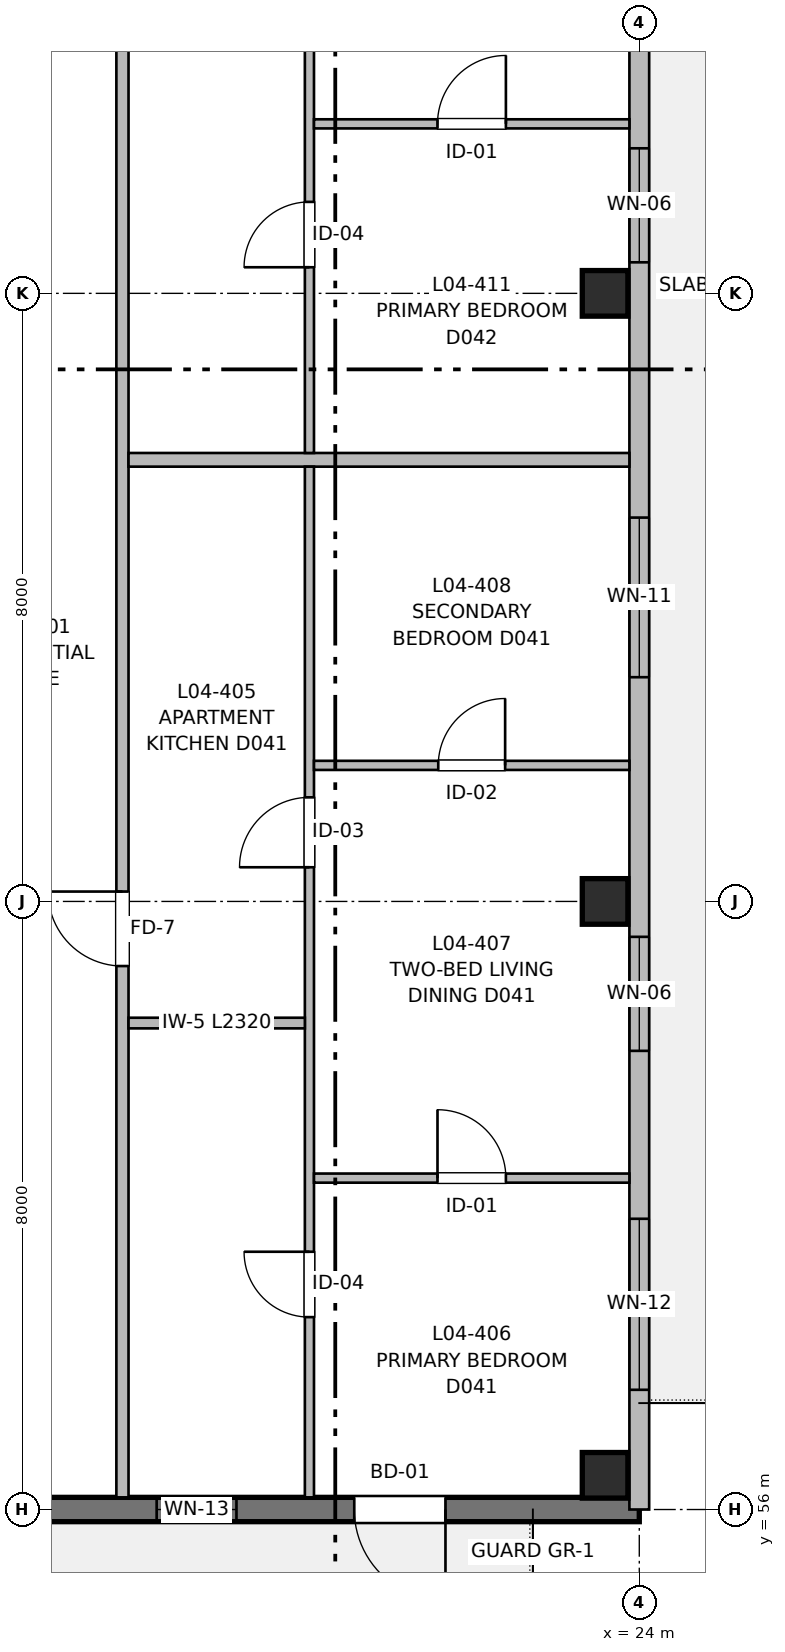
"""IFC4 building model, lengths in metres.
Left out: names, types, materials, properties, quantities, classifications, styles, units other than length and angle.
Written with IfcOpenShell. Run it as: python <this file> out.ifc"""

import sys

from ifc_helpers import new_model, si_unit, direction, frame, frame_2d, origin, origin_2d, place, context, subcontext, project, spatial, rectangle, extrude, element, fill, save


model = new_model("IFC4")
c1 = context("Model", 3, precision=1e-05, world=origin(), true_north=direction((0.0, 1.0)))
c2 = subcontext(c1, "Body", "Model", "MODEL_VIEW")
j1 = project(units=[si_unit("LENGTHUNIT", "METRE"), si_unit("PLANEANGLEUNIT", "RADIAN")], contexts=[c1])
p1 = place(None, origin())
s1 = spatial("IfcSite", under=j1, at=p1, CompositionType="ELEMENT")
p2 = place(p1, origin())
s2 = spatial("IfcBuilding", under=s1, at=p2, CompositionType="ELEMENT")
p3 = place(p2, frame((0.0, 0.0, 13.76)))
s3 = spatial("IfcBuildingStorey", under=s2, at=p3, CompositionType="ELEMENT", Elevation=13.76)
for number, where, z_axis, x_axis in (
    (1, (23.55, 56.45, 0.0), (0.0, 0.0, 1.0), (1.0, 0.0, 0.0)),
    (2, (23.55, 64.0, 0.0), (0.0, 0.0, 1.0), (1.0, 0.0, 0.0)),
    (3, (23.55, 72.0, 0.0), (0.0, 0.0, 1.0), (1.0, 0.0, 0.0)),
):
    element("IfcColumn", number, at=place(p3, frame(where, z_axis=z_axis, x_axis=x_axis)), inside=s3, PredefinedType="COLUMN", context=c2, shape_type="SweptSolid", body=[
        extrude(rectangle(XDim=0.6, YDim=0.6, at=origin_2d()), origin(), (0.0, 0.0, 1.0), 3.2),
    ])
p4 = place(p3, frame((24.0, 56.0, 0.0), z_axis=(0.0, 0.0, 1.0), x_axis=(-1.0, 0.0, 0.0)))
e4 = element("IfcWall", 4, at=p4, inside=s3, PredefinedType="SHEAR", context=c2, shape_type="SweptSolid", body=[
    extrude(rectangle(XDim=16.0, YDim=0.32, at=frame_2d((8.0, 0.0))), origin(), (0.0, 0.0, 1.0), 2.98),
])
p5 = place(p4, frame((2.55, 0.0, 0.0)))
e5 = element("IfcOpeningElement", 5, at=p5, cuts=e4, PredefinedType="OPENING", context=c2, shape_type="SweptSolid", body=[
    extrude(rectangle(XDim=1.2, YDim=2.2, at=frame_2d((0.6, 1.1))), frame((0.0, 0.17, 0.0), z_axis=(0.0, -1.0, 0.0), x_axis=(1.0, 0.0, 0.0)), (0.0, 0.0, 1.0), 0.34),
])
p6 = place(p4, frame((5.3, 0.0, 0.9)))
e6 = element("IfcOpeningElement", 6, at=p6, cuts=e4, PredefinedType="OPENING", context=c2, shape_type="SweptSolid", body=[
    extrude(rectangle(XDim=1.05, YDim=1.15, at=frame_2d((0.525, 0.575))), frame((0.0, 0.17, 0.0), z_axis=(0.0, -1.0, 0.0), x_axis=(1.0, 0.0, 0.0)), (0.0, 0.0, 1.0), 0.34),
])
p7 = place(p4, frame((11.35, 0.0, 0.82)))
e7 = element("IfcOpeningElement", 7, at=p7, cuts=e4, PredefinedType="OPENING", context=c2, shape_type="SweptSolid", body=[
    extrude(rectangle(XDim=1.3, YDim=1.4, at=frame_2d((0.65, 0.7))), frame((0.0, 0.17, 0.0), z_axis=(0.0, -1.0, 0.0), x_axis=(1.0, 0.0, 0.0)), (0.0, 0.0, 1.0), 0.34),
])
p8 = place(p3, frame((24.0, 88.0, 0.0), z_axis=(0.0, 0.0, 1.0), x_axis=(0.0, -1.0, 0.0)))
e8 = element("IfcWall", 8, at=p8, inside=s3, PredefinedType="SOLIDWALL", context=c2, shape_type="SweptSolid", body=[
    extrude(rectangle(XDim=32.0, YDim=0.26, at=frame_2d((16.0, 0.0))), origin(), (0.0, 0.0, 1.0), 2.98),
])
p9 = place(p8, frame((2.1, 0.0, 0.0)))
e9 = element("IfcOpeningElement", 9, at=p9, cuts=e8, PredefinedType="OPENING", context=c2, shape_type="SweptSolid", body=[
    extrude(rectangle(XDim=1.2, YDim=2.2, at=frame_2d((0.6, 1.1))), frame((0.0, 0.14, 0.0), z_axis=(0.0, -1.0, 0.0), x_axis=(1.0, 0.0, 0.0)), (0.0, 0.0, 1.0), 0.28),
])
p10 = place(p8, frame((5.3, 0.0, 0.9)))
e10 = element("IfcOpeningElement", 10, at=p10, cuts=e8, PredefinedType="OPENING", context=c2, shape_type="SweptSolid", body=[
    extrude(rectangle(XDim=1.05, YDim=1.15, at=frame_2d((0.525, 0.575))), frame((0.0, 0.14, 0.0), z_axis=(0.0, -1.0, 0.0), x_axis=(1.0, 0.0, 0.0)), (0.0, 0.0, 1.0), 0.28),
])
p11 = place(p8, frame((11.35, 0.0, 0.82)))
e11 = element("IfcOpeningElement", 11, at=p11, cuts=e8, PredefinedType="OPENING", context=c2, shape_type="SweptSolid", body=[
    extrude(rectangle(XDim=1.3, YDim=1.4, at=frame_2d((0.65, 0.7))), frame((0.0, 0.14, 0.0), z_axis=(0.0, -1.0, 0.0), x_axis=(1.0, 0.0, 0.0)), (0.0, 0.0, 1.0), 0.28),
])
p12 = place(p8, frame((18.95, 0.0, 0.67)))
e12 = element("IfcOpeningElement", 12, at=p12, cuts=e8, PredefinedType="OPENING", context=c2, shape_type="SweptSolid", body=[
    extrude(rectangle(XDim=2.1, YDim=1.55, at=frame_2d((1.05, 0.775))), frame((0.0, 0.14, 0.0), z_axis=(0.0, -1.0, 0.0), x_axis=(1.0, 0.0, 0.0)), (0.0, 0.0, 1.0), 0.28),
])
p13 = place(p8, frame((28.175, 0.0, 0.72)))
e13 = element("IfcOpeningElement", 13, at=p13, cuts=e8, PredefinedType="OPENING", context=c2, shape_type="SweptSolid", body=[
    extrude(rectangle(XDim=2.25, YDim=1.5, at=frame_2d((1.125, 0.75))), frame((0.0, 0.14, 0.0), z_axis=(0.0, -1.0, 0.0), x_axis=(1.0, 0.0, 0.0)), (0.0, 0.0, 1.0), 0.28),
])
p14 = place(p8, frame((24.466, 0.0, 0.82)))
e14 = element("IfcOpeningElement", 14, at=p14, cuts=e8, PredefinedType="OPENING", context=c2, shape_type="SweptSolid", body=[
    extrude(rectangle(XDim=1.5, YDim=1.4, at=frame_2d((0.75, 0.7))), frame((0.0, 0.14, 0.0), z_axis=(0.0, -1.0, 0.0), x_axis=(1.0, 0.0, 0.0)), (0.0, 0.0, 1.0), 0.28),
])
p15 = place(p8, frame((14.092, 0.0, 0.82)))
e15 = element("IfcOpeningElement", 15, at=p15, cuts=e8, PredefinedType="OPENING", context=c2, shape_type="SweptSolid", body=[
    extrude(rectangle(XDim=1.5, YDim=1.4, at=frame_2d((0.75, 0.7))), frame((0.0, 0.14, 0.0), z_axis=(0.0, -1.0, 0.0), x_axis=(1.0, 0.0, 0.0)), (0.0, 0.0, 1.0), 0.28),
])
p16 = place(p3, frame((17.2, 56.16, 0.0), z_axis=(0.0, 0.0, 1.0), x_axis=(0.0, 1.0, 0.0)))
e16 = element("IfcWall", 16, at=p16, inside=s3, PredefinedType="PARTITIONING", context=c2, shape_type="SweptSolid", body=[
    extrude(rectangle(XDim=50.64, YDim=0.16, at=frame_2d((25.32, 0.0))), origin(), (0.0, 0.0, 1.0), 2.935),
])
p17 = place(p16, frame((6.99, 0.0, 0.0)))
e17 = element("IfcOpeningElement", 17, at=p17, cuts=e16, PredefinedType="OPENING", context=c2, shape_type="SweptSolid", body=[
    extrude(rectangle(XDim=0.98, YDim=2.15, at=frame_2d((0.49, 1.075))), frame((0.0, 0.09, 0.0), z_axis=(0.0, -1.0, 0.0), x_axis=(1.0, 0.0, 0.0)), (0.0, 0.0, 1.0), 0.18),
])
p18 = place(p16, frame((20.92, 0.0, 0.0)))
e18 = element("IfcOpeningElement", 18, at=p18, cuts=e16, PredefinedType="OPENING", context=c2, shape_type="SweptSolid", body=[
    extrude(rectangle(XDim=0.98, YDim=2.15, at=frame_2d((0.49, 1.075))), frame((0.0, 0.09, 0.0), z_axis=(0.0, -1.0, 0.0), x_axis=(1.0, 0.0, 0.0)), (0.0, 0.0, 1.0), 0.18),
])
p19 = place(p16, frame((33.68, 0.0, 0.0)))
e19 = element("IfcOpeningElement", 19, at=p19, cuts=e16, PredefinedType="OPENING", context=c2, shape_type="SweptSolid", body=[
    extrude(rectangle(XDim=0.98, YDim=2.15, at=frame_2d((0.49, 1.075))), frame((0.0, 0.09, 0.0), z_axis=(0.0, -1.0, 0.0), x_axis=(1.0, 0.0, 0.0)), (0.0, 0.0, 1.0), 0.18),
])
p20 = place(p16, frame((45.08, 0.0, 0.0)))
e20 = element("IfcOpeningElement", 20, at=p20, cuts=e16, PredefinedType="OPENING", context=c2, shape_type="SweptSolid", body=[
    extrude(rectangle(XDim=0.98, YDim=2.15, at=frame_2d((0.49, 1.075))), frame((0.0, 0.09, 0.0), z_axis=(0.0, -1.0, 0.0), x_axis=(1.0, 0.0, 0.0)), (0.0, 0.0, 1.0), 0.18),
])
p21 = place(p3, frame((17.28, 69.81, 0.0), z_axis=(0.0, 0.0, 1.0), x_axis=(1.0, 0.0, 0.0)))
e21 = element("IfcWall", 21, at=p21, inside=s3, PredefinedType="PARTITIONING", context=c2, shape_type="SweptSolid", body=[
    extrude(rectangle(XDim=6.59, YDim=0.18, at=frame_2d((3.295, 0.0))), origin(), (0.0, 0.0, 1.0), 2.935),
])
p22 = place(p3, frame((19.66, 56.16, 0.0), z_axis=(0.0, 0.0, 1.0), x_axis=(0.0, 1.0, 0.0)))
e22 = element("IfcWall", 22, at=p22, inside=s3, PredefinedType="PARTITIONING", context=c2, shape_type="SweptSolid", body=[
    extrude(rectangle(XDim=13.56, YDim=0.12, at=frame_2d((6.78, 0.0))), origin(), (0.0, 0.0, 1.0), 2.935),
])
p23 = place(p22, frame((2.371, 0.0, 0.0)))
e23 = element("IfcOpeningElement", 23, at=p23, cuts=e22, PredefinedType="OPENING", context=c2, shape_type="SweptSolid", body=[
    extrude(rectangle(XDim=0.86, YDim=2.1, at=frame_2d((0.43, 1.05))), frame((0.0, 0.07, 0.0), z_axis=(0.0, -1.0, 0.0), x_axis=(1.0, 0.0, 0.0)), (0.0, 0.0, 1.0), 0.14),
])
p24 = place(p22, frame((8.29, 0.0, 0.0)))
e24 = element("IfcOpeningElement", 24, at=p24, cuts=e22, PredefinedType="OPENING", context=c2, shape_type="SweptSolid", body=[
    extrude(rectangle(XDim=0.92, YDim=2.1, at=frame_2d((0.46, 1.05))), frame((0.0, 0.07, 0.0), z_axis=(0.0, -1.0, 0.0), x_axis=(1.0, 0.0, 0.0)), (0.0, 0.0, 1.0), 0.14),
])
p25 = place(p3, frame((17.28, 62.4, 0.0), z_axis=(0.0, 0.0, 1.0), x_axis=(1.0, 0.0, 0.0)))
e25 = element("IfcWall", 25, at=p25, inside=s3, PredefinedType="PARTITIONING", context=c2, shape_type="SweptSolid", body=[
    extrude(rectangle(XDim=2.32, YDim=0.14, at=frame_2d((1.16, 0.0))), origin(), (0.0, 0.0, 1.0), 2.935),
])
p26 = place(p3, frame((19.72, 60.36, 0.0), z_axis=(0.0, 0.0, 1.0), x_axis=(1.0, 0.0, 0.0)))
e26 = element("IfcWall", 26, at=p26, inside=s3, PredefinedType="PARTITIONING", context=c2, shape_type="SweptSolid", body=[
    extrude(rectangle(XDim=4.15, YDim=0.12, at=frame_2d((2.075, 0.0))), origin(), (0.0, 0.0, 1.0), 2.935),
])
p27 = place(p26, frame((1.625, 0.0, 0.0)))
e27 = element("IfcOpeningElement", 27, at=p27, cuts=e26, PredefinedType="OPENING", context=c2, shape_type="SweptSolid", body=[
    extrude(rectangle(XDim=0.9, YDim=2.1, at=frame_2d((0.45, 1.05))), frame((0.0, 0.07, 0.0), z_axis=(0.0, -1.0, 0.0), x_axis=(1.0, 0.0, 0.0)), (0.0, 0.0, 1.0), 0.14),
])
p28 = place(p3, frame((19.72, 65.79, 0.0), z_axis=(0.0, 0.0, 1.0), x_axis=(1.0, 0.0, 0.0)))
e28 = element("IfcWall", 28, at=p28, inside=s3, PredefinedType="PARTITIONING", context=c2, shape_type="SweptSolid", body=[
    extrude(rectangle(XDim=4.15, YDim=0.12, at=frame_2d((2.075, 0.0))), origin(), (0.0, 0.0, 1.0), 2.935),
])
p29 = place(p28, frame((1.635, 0.0, 0.0)))
e29 = element("IfcOpeningElement", 29, at=p29, cuts=e28, PredefinedType="OPENING", context=c2, shape_type="SweptSolid", body=[
    extrude(rectangle(XDim=0.88, YDim=2.1, at=frame_2d((0.44, 1.05))), frame((0.0, 0.07, 0.0), z_axis=(0.0, -1.0, 0.0), x_axis=(1.0, 0.0, 0.0)), (0.0, 0.0, 1.0), 0.14),
])
p30 = place(p3, frame((19.66, 69.9, 0.0), z_axis=(0.0, 0.0, 1.0), x_axis=(0.0, 1.0, 0.0)))
e30 = element("IfcWall", 30, at=p30, inside=s3, PredefinedType="PARTITIONING", context=c2, shape_type="SweptSolid", body=[
    extrude(rectangle(XDim=13.98, YDim=0.12, at=frame_2d((6.99, 0.0))), origin(), (0.0, 0.0, 1.0), 2.935),
])
p31 = place(p30, frame((2.443, 0.0, 0.0)))
e31 = element("IfcOpeningElement", 31, at=p31, cuts=e30, PredefinedType="OPENING", context=c2, shape_type="SweptSolid", body=[
    extrude(rectangle(XDim=0.86, YDim=2.1, at=frame_2d((0.43, 1.05))), frame((0.0, 0.07, 0.0), z_axis=(0.0, -1.0, 0.0), x_axis=(1.0, 0.0, 0.0)), (0.0, 0.0, 1.0), 0.14),
])
p32 = place(p30, frame((8.544, 0.0, 0.0)))
e32 = element("IfcOpeningElement", 32, at=p32, cuts=e30, PredefinedType="OPENING", context=c2, shape_type="SweptSolid", body=[
    extrude(rectangle(XDim=0.92, YDim=2.1, at=frame_2d((0.46, 1.05))), frame((0.0, 0.07, 0.0), z_axis=(0.0, -1.0, 0.0), x_axis=(1.0, 0.0, 0.0)), (0.0, 0.0, 1.0), 0.14),
])
p33 = place(p3, frame((19.72, 74.23, 0.0), z_axis=(0.0, 0.0, 1.0), x_axis=(1.0, 0.0, 0.0)))
e33 = element("IfcWall", 33, at=p33, inside=s3, PredefinedType="PARTITIONING", context=c2, shape_type="SweptSolid", body=[
    extrude(rectangle(XDim=4.15, YDim=0.12, at=frame_2d((2.075, 0.0))), origin(), (0.0, 0.0, 1.0), 2.935),
])
p34 = place(p33, frame((1.625, 0.0, 0.0)))
e34 = element("IfcOpeningElement", 34, at=p34, cuts=e33, PredefinedType="OPENING", context=c2, shape_type="SweptSolid", body=[
    extrude(rectangle(XDim=0.9, YDim=2.1, at=frame_2d((0.45, 1.05))), frame((0.0, 0.07, 0.0), z_axis=(0.0, -1.0, 0.0), x_axis=(1.0, 0.0, 0.0)), (0.0, 0.0, 1.0), 0.14),
])
p35 = place(p5, origin())
e35 = element("IfcDoor", 35, at=p35, inside=s3, OperationType="SINGLE_SWING_LEFT", PredefinedType="DOOR", context=c2, shape_type="SweptSolid", body=[
    extrude(rectangle(XDim=1.2, YDim=2.2, at=frame_2d((0.6, 1.1))), frame((0.0, 0.025, 0.0), z_axis=(0.0, -1.0, 0.0), x_axis=(1.0, 0.0, 0.0)), (0.0, 0.0, 1.0), 0.05),
])
fill(e5, e35)
p36 = place(p6, origin())
e36 = element("IfcWindow", 36, at=p36, inside=s3, PartitioningType="SINGLE_PANEL", PredefinedType="WINDOW", context=c2, shape_type="SweptSolid", body=[
    extrude(rectangle(XDim=1.05, YDim=1.15, at=frame_2d((0.525, 0.575))), frame((0.0, 0.03, 0.0), z_axis=(0.0, -1.0, 0.0), x_axis=(1.0, 0.0, 0.0)), (0.0, 0.0, 1.0), 0.06),
])
fill(e6, e36)
p37 = place(p12, origin())
e37 = element("IfcWindow", 37, at=p37, inside=s3, PartitioningType="SINGLE_PANEL", PredefinedType="WINDOW", context=c2, shape_type="SweptSolid", body=[
    extrude(rectangle(XDim=2.1, YDim=1.55, at=frame_2d((1.05, 0.775))), frame((0.0, 0.03, 0.0), z_axis=(0.0, -1.0, 0.0), x_axis=(1.0, 0.0, 0.0)), (0.0, 0.0, 1.0), 0.06),
])
fill(e12, e37)
p38 = place(p13, origin())
e38 = element("IfcWindow", 38, at=p38, inside=s3, PartitioningType="SINGLE_PANEL", PredefinedType="WINDOW", context=c2, shape_type="SweptSolid", body=[
    extrude(rectangle(XDim=2.25, YDim=1.5, at=frame_2d((1.125, 0.75))), frame((0.0, 0.03, 0.0), z_axis=(0.0, -1.0, 0.0), x_axis=(1.0, 0.0, 0.0)), (0.0, 0.0, 1.0), 0.06),
])
fill(e13, e38)
p39 = place(p23, origin())
e39 = element("IfcDoor", 39, at=p39, inside=s3, OperationType="SINGLE_SWING_RIGHT", PredefinedType="DOOR", context=c2, shape_type="SweptSolid", body=[
    extrude(rectangle(XDim=0.86, YDim=2.1, at=frame_2d((0.43, 1.05))), frame((0.0, 0.025, 0.0), z_axis=(0.0, -1.0, 0.0), x_axis=(1.0, 0.0, 0.0)), (0.0, 0.0, 1.0), 0.05),
])
fill(e23, e39)
p40 = place(p24, origin())
e40 = element("IfcDoor", 40, at=p40, inside=s3, OperationType="SINGLE_SWING_LEFT", PredefinedType="DOOR", context=c2, shape_type="SweptSolid", body=[
    extrude(rectangle(XDim=0.92, YDim=2.1, at=frame_2d((0.46, 1.05))), frame((0.0, 0.025, 0.0), z_axis=(0.0, -1.0, 0.0), x_axis=(1.0, 0.0, 0.0)), (0.0, 0.0, 1.0), 0.05),
])
fill(e24, e40)
p41 = place(p17, origin())
e41 = element("IfcDoor", 41, at=p41, inside=s3, OperationType="SINGLE_SWING_RIGHT", PredefinedType="DOOR", context=c2, shape_type="SweptSolid", body=[
    extrude(rectangle(XDim=0.98, YDim=2.15, at=frame_2d((0.49, 1.075))), frame((0.0, 0.025, 0.0), z_axis=(0.0, -1.0, 0.0), x_axis=(1.0, 0.0, 0.0)), (0.0, 0.0, 1.0), 0.05),
])
fill(e17, e41)
p42 = place(p27, origin())
e42 = element("IfcDoor", 42, at=p42, inside=s3, OperationType="SINGLE_SWING_LEFT", PredefinedType="DOOR", context=c2, shape_type="SweptSolid", body=[
    extrude(rectangle(XDim=0.9, YDim=2.1, at=frame_2d((0.45, 1.05))), frame((0.0, 0.025, 0.0), z_axis=(0.0, -1.0, 0.0), x_axis=(1.0, 0.0, 0.0)), (0.0, 0.0, 1.0), 0.05),
])
fill(e27, e42)
p43 = place(p29, origin())
e43 = element("IfcDoor", 43, at=p43, inside=s3, OperationType="SINGLE_SWING_RIGHT", PredefinedType="DOOR", context=c2, shape_type="SweptSolid", body=[
    extrude(rectangle(XDim=0.88, YDim=2.1, at=frame_2d((0.44, 1.05))), frame((0.0, 0.025, 0.0), z_axis=(0.0, -1.0, 0.0), x_axis=(1.0, 0.0, 0.0)), (0.0, 0.0, 1.0), 0.05),
])
fill(e29, e43)
p44 = place(p31, origin())
e44 = element("IfcDoor", 44, at=p44, inside=s3, OperationType="SINGLE_SWING_LEFT", PredefinedType="DOOR", context=c2, shape_type="SweptSolid", body=[
    extrude(rectangle(XDim=0.86, YDim=2.1, at=frame_2d((0.43, 1.05))), frame((0.0, 0.025, 0.0), z_axis=(0.0, -1.0, 0.0), x_axis=(1.0, 0.0, 0.0)), (0.0, 0.0, 1.0), 0.05),
])
fill(e31, e44)
p45 = place(p34, origin())
e45 = element("IfcDoor", 45, at=p45, inside=s3, OperationType="SINGLE_SWING_RIGHT", PredefinedType="DOOR", context=c2, shape_type="SweptSolid", body=[
    extrude(rectangle(XDim=0.9, YDim=2.1, at=frame_2d((0.45, 1.05))), frame((0.0, 0.025, 0.0), z_axis=(0.0, -1.0, 0.0), x_axis=(1.0, 0.0, 0.0)), (0.0, 0.0, 1.0), 0.05),
])
fill(e34, e45)
p46 = place(p14, origin())
e46 = element("IfcWindow", 46, at=p46, inside=s3, PartitioningType="SINGLE_PANEL", PredefinedType="WINDOW", context=c2, shape_type="SweptSolid", body=[
    extrude(rectangle(XDim=1.5, YDim=1.4, at=frame_2d((0.75, 0.7))), frame((0.0, 0.03, 0.0), z_axis=(0.0, -1.0, 0.0), x_axis=(1.0, 0.0, 0.0)), (0.0, 0.0, 1.0), 0.06),
])
fill(e14, e46)
p47 = place(p15, origin())
e47 = element("IfcWindow", 47, at=p47, inside=s3, PartitioningType="SINGLE_PANEL", PredefinedType="WINDOW", context=c2, shape_type="SweptSolid", body=[
    extrude(rectangle(XDim=1.5, YDim=1.4, at=frame_2d((0.75, 0.7))), frame((0.0, 0.03, 0.0), z_axis=(0.0, -1.0, 0.0), x_axis=(1.0, 0.0, 0.0)), (0.0, 0.0, 1.0), 0.06),
])
fill(e15, e47)
save(model, sys.argv[1])
